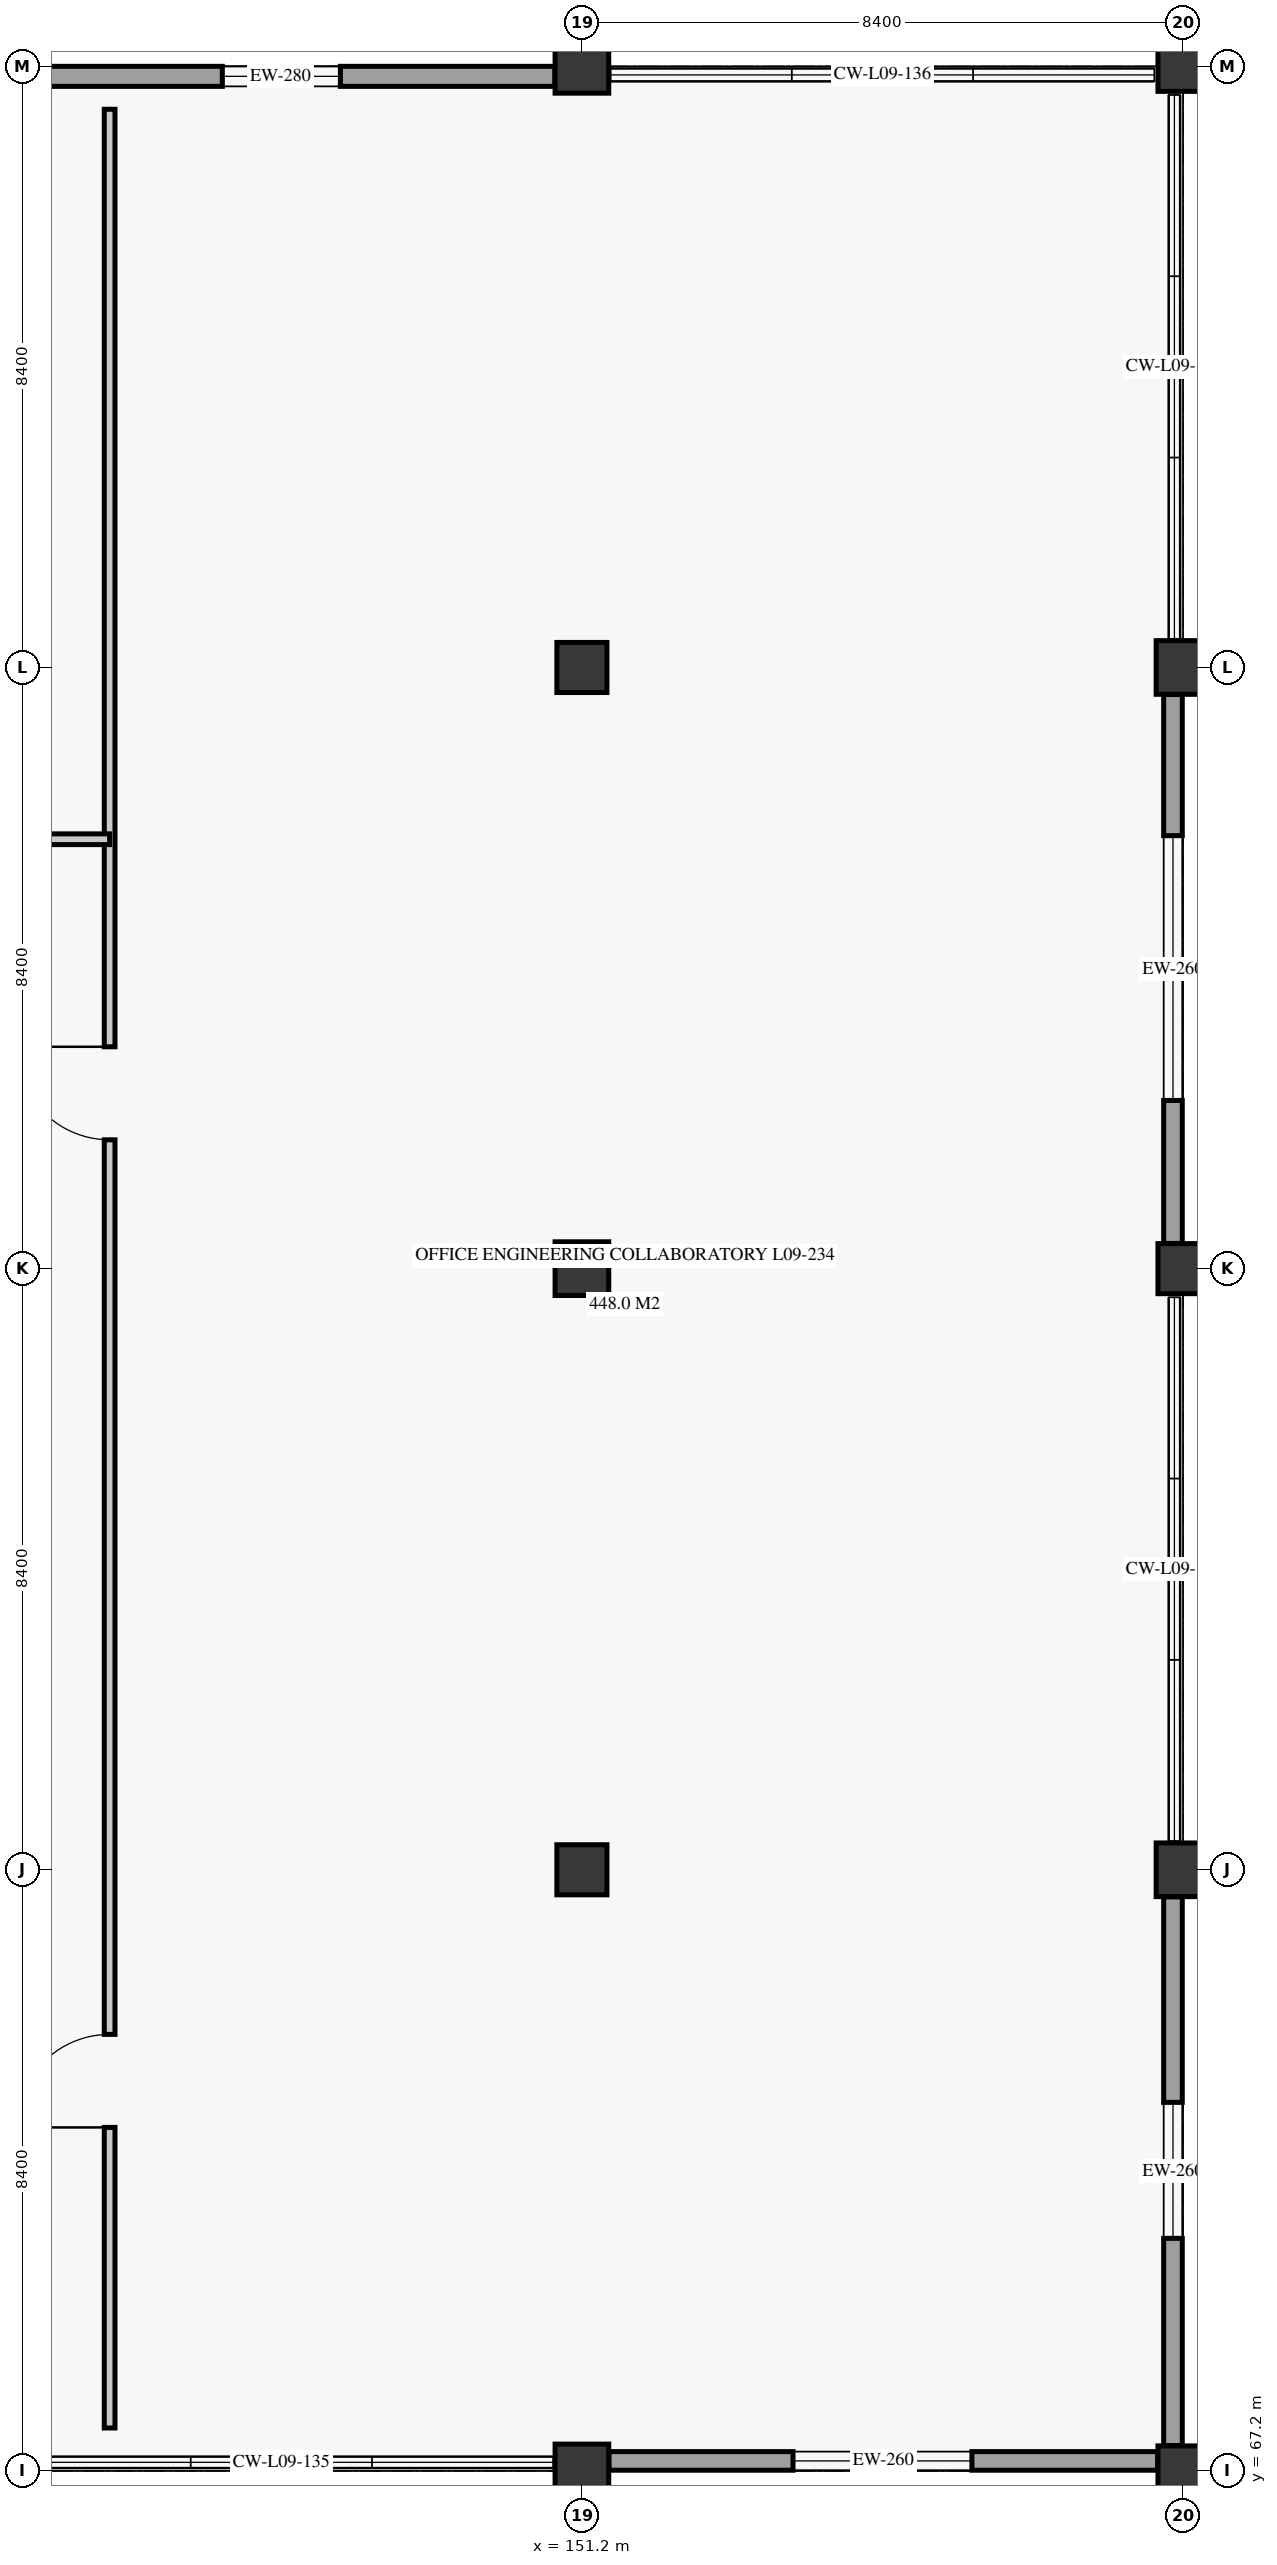
"""IFC4 building model, lengths in metres.
Left out: names, types, materials, properties, quantities, classifications, styles, units other than length and angle.
Written with IfcOpenShell. Run it as: python <this file> out.ifc"""

import sys

from ifc_helpers import new_model, si_unit, direction, frame, frame_2d, origin, origin_2d, place, context, subcontext, project, spatial, rectangle, extrude, element, fill, save


model = new_model("IFC4")
c1 = context("Model", 3, precision=1e-05, world=origin(), true_north=direction((0.0, 1.0)))
c2 = subcontext(c1, "Body", "Model", "MODEL_VIEW")
j1 = project(units=[si_unit("LENGTHUNIT", "METRE"), si_unit("PLANEANGLEUNIT", "RADIAN")], contexts=[c1])
p1 = place(None, origin())
s1 = spatial("IfcSite", under=j1, at=p1, CompositionType="ELEMENT")
p2 = place(p1, origin())
s2 = spatial("IfcBuilding", under=s1, at=p2, CompositionType="ELEMENT")
p3 = place(p2, frame((0.0, 0.0, 38.7)))
s3 = spatial("IfcBuildingStorey", under=s2, at=p3, CompositionType="ELEMENT", Elevation=38.7)
p4 = place(p3, frame((151.2, 67.2, 0.0), z_axis=(0.0, 0.0, 1.0), x_axis=(1.0, 0.0, 0.0)))
e1 = element("IfcColumn", 1, at=p4, inside=s3, PredefinedType="COLUMN", context=c2, shape_type="SweptSolid", body=[
    extrude(rectangle(XDim=0.75, YDim=0.75, at=origin_2d()), origin(), (0.0, 0.0, 1.0), 3.72),
])
p5 = place(p3, frame((151.2, 75.6, 0.0), z_axis=(0.0, 0.0, 1.0), x_axis=(1.0, 0.0, 0.0)))
e2 = element("IfcColumn", 2, at=p5, inside=s3, PredefinedType="COLUMN", context=c2, shape_type="SweptSolid", body=[
    extrude(rectangle(XDim=0.7, YDim=0.7, at=origin_2d()), origin(), (0.0, 0.0, 1.0), 3.72),
])
p6 = place(p3, frame((151.2, 84.0, 0.0), z_axis=(0.0, 0.0, 1.0), x_axis=(1.0, 0.0, 0.0)))
e3 = element("IfcColumn", 3, at=p6, inside=s3, PredefinedType="COLUMN", context=c2, shape_type="SweptSolid", body=[
    extrude(rectangle(XDim=0.75, YDim=0.75, at=origin_2d()), origin(), (0.0, 0.0, 1.0), 3.72),
])
p7 = place(p3, frame((151.2, 92.4, 0.0), z_axis=(0.0, 0.0, 1.0), x_axis=(1.0, 0.0, 0.0)))
e4 = element("IfcColumn", 4, at=p7, inside=s3, PredefinedType="COLUMN", context=c2, shape_type="SweptSolid", body=[
    extrude(rectangle(XDim=0.7, YDim=0.7, at=origin_2d()), origin(), (0.0, 0.0, 1.0), 3.72),
])
p8 = place(p3, frame((151.2, 100.8, 0.0), z_axis=(0.0, 0.0, 1.0), x_axis=(1.0, 0.0, 0.0)))
e5 = element("IfcColumn", 5, at=p8, inside=s3, PredefinedType="COLUMN", context=c2, shape_type="SweptSolid", body=[
    extrude(rectangle(XDim=0.75, YDim=0.75, at=origin_2d()), origin(), (0.0, 0.0, 1.0), 3.72),
])
p9 = place(p3, frame((159.6, 67.2, 0.0), z_axis=(0.0, 0.0, 1.0), x_axis=(1.0, 0.0, 0.0)))
e6 = element("IfcColumn", 6, at=p9, inside=s3, PredefinedType="COLUMN", context=c2, shape_type="SweptSolid", body=[
    extrude(rectangle(XDim=0.7, YDim=0.7, at=origin_2d()), origin(), (0.0, 0.0, 1.0), 3.72),
])
p10 = place(p3, frame((159.6, 75.6, 0.0), z_axis=(0.0, 0.0, 1.0), x_axis=(1.0, 0.0, 0.0)))
e7 = element("IfcColumn", 7, at=p10, inside=s3, PredefinedType="COLUMN", context=c2, shape_type="SweptSolid", body=[
    extrude(rectangle(XDim=0.75, YDim=0.75, at=origin_2d()), origin(), (0.0, 0.0, 1.0), 3.72),
])
p11 = place(p3, frame((159.6, 84.0, 0.0), z_axis=(0.0, 0.0, 1.0), x_axis=(1.0, 0.0, 0.0)))
e8 = element("IfcColumn", 8, at=p11, inside=s3, PredefinedType="COLUMN", context=c2, shape_type="SweptSolid", body=[
    extrude(rectangle(XDim=0.7, YDim=0.7, at=origin_2d()), origin(), (0.0, 0.0, 1.0), 3.72),
])
p12 = place(p3, frame((159.6, 92.4, 0.0), z_axis=(0.0, 0.0, 1.0), x_axis=(1.0, 0.0, 0.0)))
e9 = element("IfcColumn", 9, at=p12, inside=s3, PredefinedType="COLUMN", context=c2, shape_type="SweptSolid", body=[
    extrude(rectangle(XDim=0.75, YDim=0.75, at=origin_2d()), origin(), (0.0, 0.0, 1.0), 3.72),
])
p13 = place(p3, frame((159.6, 100.8, 0.0), z_axis=(0.0, 0.0, 1.0), x_axis=(1.0, 0.0, 0.0)))
e10 = element("IfcColumn", 10, at=p13, inside=s3, PredefinedType="COLUMN", context=c2, shape_type="SweptSolid", body=[
    extrude(rectangle(XDim=0.7, YDim=0.7, at=origin_2d()), origin(), (0.0, 0.0, 1.0), 3.72),
])
p14 = place(p3, frame((143.154, 100.66, 0.0), z_axis=(0.0, 0.0, 1.0), x_axis=(1.0, 0.0, 0.0)))
e11 = element("IfcWall", 11, at=p14, inside=s3, PredefinedType="SOLIDWALL", context=c2, shape_type="SweptSolid", body=[
    extrude(rectangle(XDim=7.668, YDim=0.28, at=frame_2d((3.834, 0.0))), origin(), (0.0, 0.0, 1.0), 3.04),
])
p15 = place(p14, frame((3.021, 0.0, 0.85)))
e12 = element("IfcOpeningElement", 12, at=p15, cuts=e11, PredefinedType="OPENING", context=c2, shape_type="SweptSolid", body=[
    extrude(rectangle(XDim=1.65, YDim=1.75, at=frame_2d((0.825, 0.875))), frame((0.0, 0.15, 0.0), z_axis=(0.0, -1.0, 0.0), x_axis=(1.0, 0.0, 0.0)), (0.0, 0.0, 1.0), 0.3),
])
p16 = place(p3, frame((151.578, 67.34, 0.0), z_axis=(0.0, 0.0, 1.0), x_axis=(1.0, 0.0, 0.0)))
e13 = element("IfcWall", 13, at=p16, inside=s3, PredefinedType="SOLIDWALL", context=c2, shape_type="SweptSolid", body=[
    extrude(rectangle(XDim=7.668, YDim=0.26, at=frame_2d((3.834, 0.0))), origin(), (0.0, 0.0, 1.0), 3.04),
])
p17 = place(p16, frame((2.572, 0.0, 0.85)))
e14 = element("IfcOpeningElement", 14, at=p17, cuts=e13, PredefinedType="OPENING", context=c2, shape_type="SweptSolid", body=[
    extrude(rectangle(XDim=2.5, YDim=1.8, at=frame_2d((1.25, 0.9))), frame((0.0, 0.14, 0.0), z_axis=(0.0, -1.0, 0.0), x_axis=(1.0, 0.0, 0.0)), (0.0, 0.0, 1.0), 0.28),
])
p18 = place(p3, frame((159.46, 67.554, 0.0), z_axis=(0.0, 0.0, 1.0), x_axis=(0.0, 1.0, 0.0)))
e15 = element("IfcWall", 15, at=p18, inside=s3, PredefinedType="SOLIDWALL", context=c2, shape_type="SweptSolid", body=[
    extrude(rectangle(XDim=7.668, YDim=0.26, at=frame_2d((3.834, 0.0))), origin(), (0.0, 0.0, 1.0), 3.04),
])
p19 = place(p18, frame((2.896, 0.0, 0.85)))
e16 = element("IfcOpeningElement", 16, at=p19, cuts=e15, PredefinedType="OPENING", context=c2, shape_type="SweptSolid", body=[
    extrude(rectangle(XDim=1.9, YDim=1.75, at=frame_2d((0.95, 0.875))), frame((0.0, 0.14, 0.0), z_axis=(0.0, -1.0, 0.0), x_axis=(1.0, 0.0, 0.0)), (0.0, 0.0, 1.0), 0.28),
])
p20 = place(p3, frame((159.46, 84.352, 0.0), z_axis=(0.0, 0.0, 1.0), x_axis=(0.0, 1.0, 0.0)))
e17 = element("IfcWall", 17, at=p20, inside=s3, PredefinedType="SOLIDWALL", context=c2, shape_type="SweptSolid", body=[
    extrude(rectangle(XDim=7.67, YDim=0.26, at=frame_2d((3.835, 0.0))), origin(), (0.0, 0.0, 1.0), 3.04),
])
p21 = place(p20, frame((1.998, 0.0, 0.85)))
e18 = element("IfcOpeningElement", 18, at=p21, cuts=e17, PredefinedType="OPENING", context=c2, shape_type="SweptSolid", body=[
    extrude(rectangle(XDim=3.7, YDim=1.9, at=frame_2d((1.85, 0.95))), frame((0.0, 0.14, 0.0), z_axis=(0.0, -1.0, 0.0), x_axis=(1.0, 0.0, 0.0)), (0.0, 0.0, 1.0), 0.28),
])
p22 = place(p3, frame((144.6, 67.8, 0.0), z_axis=(0.0, 0.0, 1.0), x_axis=(0.0, 1.0, 0.0)))
e19 = element("IfcWall", 19, at=p22, inside=s3, PredefinedType="PARTITIONING", context=c2, shape_type="SweptSolid", body=[
    extrude(rectangle(XDim=32.4, YDim=0.15, at=frame_2d((16.2, 0.0))), origin(), (0.0, 0.0, 1.0), 3.34),
])
p23 = place(p22, frame((4.2, 0.0, 0.0)))
e20 = element("IfcOpeningElement", 20, at=p23, cuts=e19, PredefinedType="OPENING", context=c2, shape_type="SweptSolid", body=[
    extrude(rectangle(XDim=1.3, YDim=2.35, at=frame_2d((0.65, 1.175))), frame((0.0, 0.085, 0.0), z_axis=(0.0, -1.0, 0.0), x_axis=(1.0, 0.0, 0.0)), (0.0, 0.0, 1.0), 0.17),
])
p24 = place(p22, frame((18.0, 0.0, 0.0)))
e21 = element("IfcOpeningElement", 21, at=p24, cuts=e19, PredefinedType="OPENING", context=c2, shape_type="SweptSolid", body=[
    extrude(rectangle(XDim=1.3, YDim=2.35, at=frame_2d((0.65, 1.175))), frame((0.0, 0.085, 0.0), z_axis=(0.0, -1.0, 0.0), x_axis=(1.0, 0.0, 0.0)), (0.0, 0.0, 1.0), 0.17),
])
p25 = place(p3, frame((118.2, 90.0, 0.0), z_axis=(0.0, 0.0, 1.0), x_axis=(1.0, 0.0, 0.0)))
e22 = element("IfcWall", 22, at=p25, inside=s3, PredefinedType="PARTITIONING", context=c2, shape_type="SweptSolid", body=[
    extrude(rectangle(XDim=26.4, YDim=0.15, at=frame_2d((13.2, 0.0))), origin(), (0.0, 0.0, 1.0), 3.34),
])
p26 = place(p25, frame((3.2, 0.0, 0.0)))
e23 = element("IfcOpeningElement", 23, at=p26, cuts=e22, PredefinedType="OPENING", context=c2, shape_type="SweptSolid", body=[
    extrude(rectangle(XDim=1.4, YDim=2.35, at=frame_2d((0.7, 1.175))), frame((0.0, 0.085, 0.0), z_axis=(0.0, -1.0, 0.0), x_axis=(1.0, 0.0, 0.0)), (0.0, 0.0, 1.0), 0.17),
])
p27 = place(p25, frame((21.0, 0.0, 0.0)))
e24 = element("IfcOpeningElement", 24, at=p27, cuts=e22, PredefinedType="OPENING", context=c2, shape_type="SweptSolid", body=[
    extrude(rectangle(XDim=1.4, YDim=2.35, at=frame_2d((0.7, 1.175))), frame((0.0, 0.085, 0.0), z_axis=(0.0, -1.0, 0.0), x_axis=(1.0, 0.0, 0.0)), (0.0, 0.0, 1.0), 0.17),
])
p28 = place(p15, origin())
e25 = element("IfcWindow", 25, at=p28, inside=s3, PartitioningType="SINGLE_PANEL", PredefinedType="WINDOW", context=c2, shape_type="SweptSolid", body=[
    extrude(rectangle(XDim=1.65, YDim=1.75, at=frame_2d((0.825, 0.875))), frame((0.0, 0.03, 0.0), z_axis=(0.0, -1.0, 0.0), x_axis=(1.0, 0.0, 0.0)), (0.0, 0.0, 1.0), 0.06),
])
fill(e12, e25)
p29 = place(p17, origin())
e26 = element("IfcWindow", 26, at=p29, inside=s3, PartitioningType="SINGLE_PANEL", PredefinedType="WINDOW", context=c2, shape_type="SweptSolid", body=[
    extrude(rectangle(XDim=2.5, YDim=1.8, at=frame_2d((1.25, 0.9))), frame((0.0, 0.03, 0.0), z_axis=(0.0, -1.0, 0.0), x_axis=(1.0, 0.0, 0.0)), (0.0, 0.0, 1.0), 0.06),
])
fill(e14, e26)
p30 = place(p19, origin())
e27 = element("IfcWindow", 27, at=p30, inside=s3, PartitioningType="SINGLE_PANEL", PredefinedType="WINDOW", context=c2, shape_type="SweptSolid", body=[
    extrude(rectangle(XDim=1.9, YDim=1.75, at=frame_2d((0.95, 0.875))), frame((0.0, 0.03, 0.0), z_axis=(0.0, -1.0, 0.0), x_axis=(1.0, 0.0, 0.0)), (0.0, 0.0, 1.0), 0.06),
])
fill(e16, e27)
p31 = place(p21, origin())
e28 = element("IfcWindow", 28, at=p31, inside=s3, PartitioningType="SINGLE_PANEL", PredefinedType="WINDOW", context=c2, shape_type="SweptSolid", body=[
    extrude(rectangle(XDim=3.7, YDim=1.9, at=frame_2d((1.85, 0.95))), frame((0.0, 0.03, 0.0), z_axis=(0.0, -1.0, 0.0), x_axis=(1.0, 0.0, 0.0)), (0.0, 0.0, 1.0), 0.06),
])
fill(e18, e28)
p32 = place(p23, origin())
e29 = element("IfcDoor", 29, at=p32, inside=s3, OperationType="SINGLE_SWING_LEFT", PredefinedType="DOOR", context=c2, shape_type="SweptSolid", body=[
    extrude(rectangle(XDim=1.3, YDim=2.35, at=frame_2d((0.65, 1.175))), frame((0.0, 0.025, 0.0), z_axis=(0.0, -1.0, 0.0), x_axis=(1.0, 0.0, 0.0)), (0.0, 0.0, 1.0), 0.05),
])
fill(e20, e29)
p33 = place(p24, origin())
e30 = element("IfcDoor", 30, at=p33, inside=s3, OperationType="SINGLE_SWING_RIGHT", PredefinedType="DOOR", context=c2, shape_type="SweptSolid", body=[
    extrude(rectangle(XDim=1.3, YDim=2.35, at=frame_2d((0.65, 1.175))), frame((0.0, 0.025, 0.0), z_axis=(0.0, -1.0, 0.0), x_axis=(1.0, 0.0, 0.0)), (0.0, 0.0, 1.0), 0.05),
])
fill(e21, e30)
save(model, sys.argv[1])
